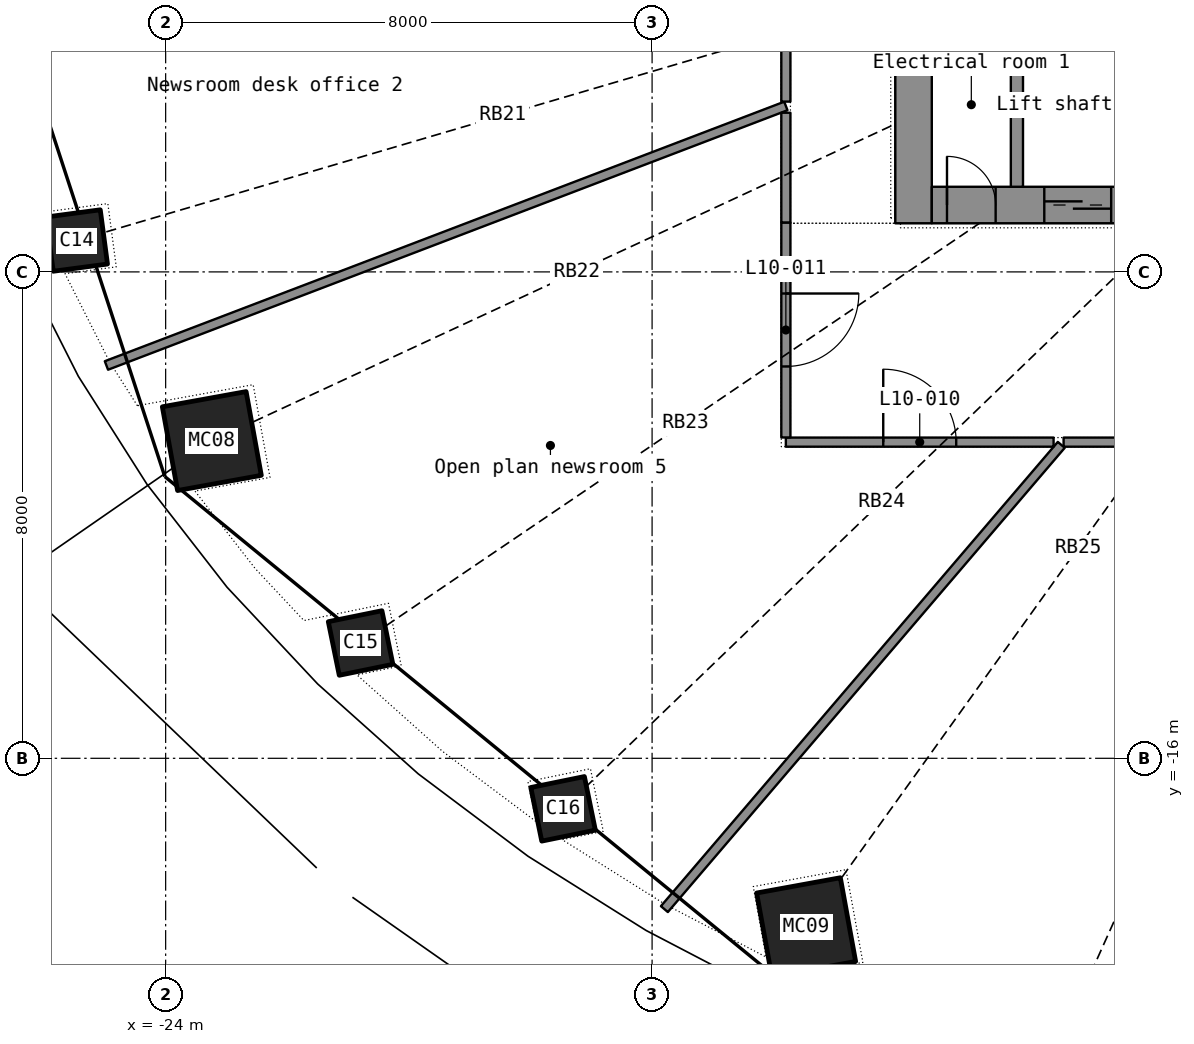
"""IFC4 building model, lengths in metres.
Left out: names, types, materials, properties, quantities, classifications, styles, units other than length and angle.
Written with IfcOpenShell. Run it as: python <this file> out.ifc"""

import sys

from ifc_helpers import new_model, si_unit, direction, frame, frame_2d, origin, origin_2d, place, context, subcontext, project, spatial, rectangle, hollow_rectangle, extrude, element, fill, save


model = new_model("IFC4")
c1 = context("Model", 3, precision=1e-05, world=origin(), true_north=direction((0.0, 1.0)))
c2 = subcontext(c1, "Body", "Model", "MODEL_VIEW")
j1 = project(units=[si_unit("LENGTHUNIT", "METRE"), si_unit("PLANEANGLEUNIT", "RADIAN")], contexts=[c1])
p1 = place(None, origin())
s1 = spatial("IfcSite", under=j1, at=p1, CompositionType="ELEMENT")
p2 = place(p1, origin())
s2 = spatial("IfcBuilding", under=s1, at=p2, CompositionType="ELEMENT")
p3 = place(p2, frame((0.0, 0.0, 48.2)))
s3 = spatial("IfcBuildingStorey", under=s2, at=p3, CompositionType="ELEMENT", Elevation=48.2)
p4 = place(p3, frame((-25.462, -7.484, 0.0), z_axis=(0.032511791, 0.009694185, 0.999424337), x_axis=(-0.409551544, 0.912276009, 0.004474057)))
e1 = element("IfcColumn", 1, at=p4, inside=s3, PredefinedType="COLUMN", context=c2, shape_type="SweptSolid", body=[
    extrude(hollow_rectangle(XDim=0.9, YDim=0.9, WallThickness=0.025, at=origin_2d()), origin(), (0.0, 0.0, 1.0), 3.702),
])
p5 = place(p3, frame((-23.24, -10.782, 0.0), z_axis=(0.029940667, 0.01417895, 0.999451106), x_axis=(-0.582456486, 0.812840346, 0.005917161)))
e2 = element("IfcColumn", 2, at=p5, inside=s3, PredefinedType="COLUMN", context=c2, shape_type="SweptSolid", body=[
    extrude(hollow_rectangle(XDim=1.4, YDim=1.4, WallThickness=0.04, at=origin_2d()), origin(), (0.0, 0.0, 1.0), 3.702),
])
p6 = place(p3, frame((-20.794, -14.104, 0.0), z_axis=(0.026512179, 0.018202391, 0.999482755), x_axis=(-0.719438902, 0.694525921, 0.006435189)))
e3 = element("IfcColumn", 3, at=p6, inside=s3, PredefinedType="COLUMN", context=c2, shape_type="SweptSolid", body=[
    extrude(hollow_rectangle(XDim=0.9, YDim=0.9, WallThickness=0.025, at=origin_2d()), origin(), (0.0, 0.0, 1.0), 3.702),
])
p7 = place(p3, frame((-17.464, -16.831, 0.0), z_axis=(0.022226156, 0.021698532, 0.999517469), x_axis=(-0.827675916, 0.561171863, 0.006222451)))
e4 = element("IfcColumn", 4, at=p7, inside=s3, PredefinedType="COLUMN", context=c2, shape_type="SweptSolid", body=[
    extrude(hollow_rectangle(XDim=0.9, YDim=0.9, WallThickness=0.025, at=origin_2d()), origin(), (0.0, 0.0, 1.0), 3.702),
])
p8 = place(p3, frame((-13.467, -18.779, 0.0), z_axis=(0.017346145, 0.024601186, 0.999546844), x_axis=(-0.907346436, 0.420348999, 0.005400326)))
e5 = element("IfcColumn", 5, at=p8, inside=s3, PredefinedType="COLUMN", context=c2, shape_type="SweptSolid", body=[
    extrude(hollow_rectangle(XDim=1.4, YDim=1.4, WallThickness=0.04, at=origin_2d()), origin(), (0.0, 0.0, 1.0), 3.702),
])
p9 = place(p3, frame((-11.7, -7.2, 0.0), z_axis=(0.0, 0.0, 1.0), x_axis=(0.0, 1.0, 0.0)))
e6 = element("IfcWall", 6, at=p9, inside=s3, PredefinedType="SHEAR", context=c2, shape_type="SweptSolid", body=[
    extrude(rectangle(XDim=14.4, YDim=0.6, at=frame_2d((7.2, 0.0))), origin(), (0.0, 0.0, 1.0), 3.3),
])
p10 = place(p9, frame((6.5, 0.0, 0.0)))
e7 = element("IfcOpeningElement", 7, at=p10, cuts=e6, PredefinedType="OPENING", context=c2, shape_type="SweptSolid", body=[
    extrude(rectangle(XDim=1.4, YDim=2.2, at=frame_2d((0.7, 1.1))), frame((0.0, 0.31, 0.0), z_axis=(0.0, -1.0, 0.0), x_axis=(1.0, 0.0, 0.0)), (0.0, 0.0, 1.0), 0.62),
])
p11 = place(p3, frame((-11.4, -6.9, 0.0), z_axis=(0.0, 0.0, 1.0), x_axis=(1.0, 0.0, 0.0)))
e8 = element("IfcWall", 8, at=p11, inside=s3, PredefinedType="SHEAR", context=c2, shape_type="SweptSolid", body=[
    extrude(rectangle(XDim=22.8, YDim=0.6, at=frame_2d((11.4, 0.0))), origin(), (0.0, 0.0, 1.0), 3.3),
])
p12 = place(p11, frame((1.85, 0.0, 0.0)))
e9 = element("IfcOpeningElement", 9, at=p12, cuts=e8, PredefinedType="OPENING", context=c2, shape_type="SweptSolid", body=[
    extrude(rectangle(XDim=1.1, YDim=2.2, at=frame_2d((0.55, 1.1))), frame((0.0, 0.31, 0.0), z_axis=(0.0, -1.0, 0.0), x_axis=(1.0, 0.0, 0.0)), (0.0, 0.0, 1.0), 0.62),
])
p13 = place(p11, frame((3.85, 0.0, 0.0)))
e10 = element("IfcOpeningElement", 10, at=p13, cuts=e8, PredefinedType="OPENING", context=c2, shape_type="SweptSolid", body=[
    extrude(rectangle(XDim=1.1, YDim=2.2, at=frame_2d((0.55, 1.1))), frame((0.0, 0.31, 0.0), z_axis=(0.0, -1.0, 0.0), x_axis=(1.0, 0.0, 0.0)), (0.0, 0.0, 1.0), 0.62),
])
p14 = place(p11, frame((5.85, 0.0, 0.0)))
e11 = element("IfcOpeningElement", 11, at=p14, cuts=e8, PredefinedType="OPENING", context=c2, shape_type="SweptSolid", body=[
    extrude(rectangle(XDim=1.1, YDim=2.2, at=frame_2d((0.55, 1.1))), frame((0.0, 0.31, 0.0), z_axis=(0.0, -1.0, 0.0), x_axis=(1.0, 0.0, 0.0)), (0.0, 0.0, 1.0), 0.62),
])
p15 = place(p11, frame((7.85, 0.0, 0.0)))
e12 = element("IfcOpeningElement", 12, at=p15, cuts=e8, PredefinedType="OPENING", context=c2, shape_type="SweptSolid", body=[
    extrude(rectangle(XDim=1.1, YDim=2.2, at=frame_2d((0.55, 1.1))), frame((0.0, 0.31, 0.0), z_axis=(0.0, -1.0, 0.0), x_axis=(1.0, 0.0, 0.0)), (0.0, 0.0, 1.0), 0.62),
])
p16 = place(p11, frame((9.85, 0.0, 0.0)))
e13 = element("IfcOpeningElement", 13, at=p16, cuts=e8, PredefinedType="OPENING", context=c2, shape_type="SweptSolid", body=[
    extrude(rectangle(XDim=1.1, YDim=2.2, at=frame_2d((0.55, 1.1))), frame((0.0, 0.31, 0.0), z_axis=(0.0, -1.0, 0.0), x_axis=(1.0, 0.0, 0.0)), (0.0, 0.0, 1.0), 0.62),
])
p17 = place(p11, frame((11.85, 0.0, 0.0)))
e14 = element("IfcOpeningElement", 14, at=p17, cuts=e8, PredefinedType="OPENING", context=c2, shape_type="SweptSolid", body=[
    extrude(rectangle(XDim=1.1, YDim=2.2, at=frame_2d((0.55, 1.1))), frame((0.0, 0.31, 0.0), z_axis=(0.0, -1.0, 0.0), x_axis=(1.0, 0.0, 0.0)), (0.0, 0.0, 1.0), 0.62),
])
p18 = place(p11, frame((13.85, 0.0, 0.0)))
e15 = element("IfcOpeningElement", 15, at=p18, cuts=e8, PredefinedType="OPENING", context=c2, shape_type="SweptSolid", body=[
    extrude(rectangle(XDim=1.1, YDim=2.2, at=frame_2d((0.55, 1.1))), frame((0.0, 0.31, 0.0), z_axis=(0.0, -1.0, 0.0), x_axis=(1.0, 0.0, 0.0)), (0.0, 0.0, 1.0), 0.62),
])
p19 = place(p11, frame((15.85, 0.0, 0.0)))
e16 = element("IfcOpeningElement", 16, at=p19, cuts=e8, PredefinedType="OPENING", context=c2, shape_type="SweptSolid", body=[
    extrude(rectangle(XDim=1.1, YDim=2.2, at=frame_2d((0.55, 1.1))), frame((0.0, 0.31, 0.0), z_axis=(0.0, -1.0, 0.0), x_axis=(1.0, 0.0, 0.0)), (0.0, 0.0, 1.0), 0.62),
])
p20 = place(p11, frame((19.85, 0.0, 0.0)))
e17 = element("IfcOpeningElement", 17, at=p20, cuts=e8, PredefinedType="OPENING", context=c2, shape_type="SweptSolid", body=[
    extrude(rectangle(XDim=1.1, YDim=2.2, at=frame_2d((0.55, 1.1))), frame((0.0, 0.31, 0.0), z_axis=(0.0, -1.0, 0.0), x_axis=(1.0, 0.0, 0.0)), (0.0, 0.0, 1.0), 0.62),
])
p21 = place(p11, frame((0.25, 0.0, 0.0)))
e18 = element("IfcOpeningElement", 18, at=p21, cuts=e8, PredefinedType="OPENING", context=c2, shape_type="SweptSolid", body=[
    extrude(rectangle(XDim=0.8, YDim=2.05, at=frame_2d((0.4, 1.025))), frame((0.0, 0.31, 0.0), z_axis=(0.0, -1.0, 0.0), x_axis=(1.0, 0.0, 0.0)), (0.0, 0.0, 1.0), 0.62),
])
p22 = place(p11, frame((21.75, 0.0, 0.0)))
e19 = element("IfcOpeningElement", 19, at=p22, cuts=e8, PredefinedType="OPENING", context=c2, shape_type="SweptSolid", body=[
    extrude(rectangle(XDim=0.8, YDim=2.05, at=frame_2d((0.4, 1.025))), frame((0.0, 0.31, 0.0), z_axis=(0.0, -1.0, 0.0), x_axis=(1.0, 0.0, 0.0)), (0.0, 0.0, 1.0), 0.62),
])
p23 = place(p3, frame((-10.0, -6.6, 0.0), z_axis=(0.0, 0.0, 1.0), x_axis=(0.0, 1.0, 0.0)))
e20 = element("IfcWall", 20, at=p23, inside=s3, PredefinedType="SHEAR", context=c2, shape_type="SweptSolid", body=[
    extrude(rectangle(XDim=2.7, YDim=0.2, at=frame_2d((1.35, 0.0))), origin(), (0.0, 0.0, 1.0), 3.3),
])
p24 = place(p3, frame((-9.232, -10.8, 0.0), z_axis=(0.0, 0.0, 1.0), x_axis=(1.0, 0.0, 0.0)))
e21 = element("IfcWall", 21, at=p24, inside=s3, PredefinedType="PARTITIONING", context=c2, shape_type="SweptSolid", body=[
    extrude(rectangle(XDim=15.381, YDim=0.15, at=frame_2d((7.69, 0.0))), origin(), (0.0, 0.0, 1.0), 2.4),
])
p25 = place(p24, frame((7.09, 0.0, 0.0)))
e22 = element("IfcOpeningElement", 22, at=p25, cuts=e21, PredefinedType="OPENING", context=c2, shape_type="SweptSolid", body=[
    extrude(rectangle(XDim=1.2, YDim=2.2, at=frame_2d((0.6, 1.1))), frame((0.0, 0.085, 0.0), z_axis=(0.0, -1.0, 0.0), x_axis=(1.0, 0.0, 0.0)), (0.0, 0.0, 1.0), 0.17),
])
p26 = place(p3, frame((-24.974, -9.539, 0.0), z_axis=(0.0, 0.0, 1.0), x_axis=(0.934173736, 0.356818485, 0.0)))
e23 = element("IfcWall", 23, at=p26, inside=s3, PredefinedType="PARTITIONING", context=c2, shape_type="SweptSolid", body=[
    extrude(rectangle(XDim=11.961, YDim=0.15, at=frame_2d((5.981, 0.0))), origin(), (0.0, 0.0, 1.0), 2.4),
])
p27 = place(p3, frame((-15.798, -18.48, 0.0), z_axis=(0.0, 0.0, 1.0), x_axis=(0.649794059, 0.760110308, 0.0)))
e24 = element("IfcWall", 24, at=p27, inside=s3, PredefinedType="PARTITIONING", context=c2, shape_type="SweptSolid", body=[
    extrude(rectangle(XDim=10.045, YDim=0.15, at=frame_2d((5.022, 0.0))), origin(), (0.0, 0.0, 1.0), 2.4),
])
p28 = place(p3, frame((-13.8, -10.8, 0.0), z_axis=(0.0, 0.0, 1.0), x_axis=(1.0, 0.0, 0.0)))
e25 = element("IfcWall", 25, at=p28, inside=s3, PredefinedType="PARTITIONING", context=c2, shape_type="SweptSolid", body=[
    extrude(rectangle(XDim=4.403, YDim=0.15, at=frame_2d((2.202, 0.0))), origin(), (0.0, 0.0, 1.0), 2.4),
])
p29 = place(p28, frame((1.602, 0.0, 0.0)))
e26 = element("IfcOpeningElement", 26, at=p29, cuts=e25, PredefinedType="OPENING", context=c2, shape_type="SweptSolid", body=[
    extrude(rectangle(XDim=1.2, YDim=2.2, at=frame_2d((0.6, 1.1))), frame((0.0, 0.085, 0.0), z_axis=(0.0, -1.0, 0.0), x_axis=(1.0, 0.0, 0.0)), (0.0, 0.0, 1.0), 0.17),
])
p30 = place(p3, frame((-13.8, -1.072, 0.0), z_axis=(0.0, 0.0, 1.0), x_axis=(0.0, -1.0, 0.0)))
e27 = element("IfcWall", 27, at=p30, inside=s3, PredefinedType="PARTITIONING", context=c2, shape_type="SweptSolid", body=[
    extrude(rectangle(XDim=4.127, YDim=0.15, at=frame_2d((2.064, 0.0))), origin(), (0.0, 0.0, 1.0), 2.4),
])
p31 = place(p30, frame((1.464, 0.0, 0.0)))
e28 = element("IfcOpeningElement", 28, at=p31, cuts=e27, PredefinedType="OPENING", context=c2, shape_type="SweptSolid", body=[
    extrude(rectangle(XDim=1.2, YDim=2.2, at=frame_2d((0.6, 1.1))), frame((0.0, 0.085, 0.0), z_axis=(0.0, -1.0, 0.0), x_axis=(1.0, 0.0, 0.0)), (0.0, 0.0, 1.0), 0.17),
])
p32 = place(p3, frame((-13.8, -7.188, 0.0), z_axis=(0.0, 0.0, 1.0), x_axis=(0.0, -1.0, 0.0)))
e29 = element("IfcWall", 29, at=p32, inside=s3, PredefinedType="PARTITIONING", context=c2, shape_type="SweptSolid", body=[
    extrude(rectangle(XDim=3.535, YDim=0.15, at=frame_2d((1.768, 0.0))), origin(), (0.0, 0.0, 1.0), 2.4),
])
p33 = place(p32, frame((1.167, 0.0, 0.0)))
e30 = element("IfcOpeningElement", 30, at=p33, cuts=e29, PredefinedType="OPENING", context=c2, shape_type="SweptSolid", body=[
    extrude(rectangle(XDim=1.2, YDim=2.2, at=frame_2d((0.6, 1.1))), frame((0.0, 0.085, 0.0), z_axis=(0.0, -1.0, 0.0), x_axis=(1.0, 0.0, 0.0)), (0.0, 0.0, 1.0), 0.17),
])
p34 = place(p3, frame((-13.8, -5.382, 0.0), z_axis=(0.0, 0.0, 1.0), x_axis=(0.0, -1.0, 0.0)))
e31 = element("IfcWall", 31, at=p34, inside=s3, PredefinedType="PARTITIONING", context=c2, shape_type="SweptSolid", body=[
    extrude(rectangle(XDim=1.805, YDim=0.15, at=frame_2d((0.902, 0.0))), origin(), (0.0, 0.0, 1.0), 2.4),
])
p35 = place(p12, origin())
e32 = element("IfcDoor", 32, at=p35, inside=s3, OperationType="DOUBLE_DOOR_SLIDING", PredefinedType="DOOR", context=c2, shape_type="SweptSolid", body=[
    extrude(rectangle(XDim=1.1, YDim=2.2, at=frame_2d((0.55, 1.1))), frame((0.0, 0.025, 0.0), z_axis=(0.0, -1.0, 0.0), x_axis=(1.0, 0.0, 0.0)), (0.0, 0.0, 1.0), 0.05),
])
fill(e9, e32)
p36 = place(p21, origin())
e33 = element("IfcDoor", 33, at=p36, inside=s3, OperationType="SINGLE_SWING_LEFT", PredefinedType="DOOR", context=c2, shape_type="SweptSolid", body=[
    extrude(rectangle(XDim=0.8, YDim=2.05, at=frame_2d((0.4, 1.025))), frame((0.0, 0.025, 0.0), z_axis=(0.0, -1.0, 0.0), x_axis=(1.0, 0.0, 0.0)), (0.0, 0.0, 1.0), 0.05),
])
fill(e18, e33)
p37 = place(p29, origin())
e34 = element("IfcDoor", 34, at=p37, inside=s3, OperationType="DOUBLE_DOOR_SINGLE_SWING", PredefinedType="DOOR", context=c2, shape_type="SweptSolid", body=[
    extrude(rectangle(XDim=1.2, YDim=2.2, at=frame_2d((0.6, 1.1))), frame((0.0, 0.025, 0.0), z_axis=(0.0, -1.0, 0.0), x_axis=(1.0, 0.0, 0.0)), (0.0, 0.0, 1.0), 0.05),
])
fill(e26, e34)
p38 = place(p33, origin())
e35 = element("IfcDoor", 35, at=p38, inside=s3, OperationType="DOUBLE_DOOR_SINGLE_SWING", PredefinedType="DOOR", context=c2, shape_type="SweptSolid", body=[
    extrude(rectangle(XDim=1.2, YDim=2.2, at=frame_2d((0.6, 1.1))), frame((0.0, 0.025, 0.0), z_axis=(0.0, -1.0, 0.0), x_axis=(1.0, 0.0, 0.0)), (0.0, 0.0, 1.0), 0.05),
])
fill(e30, e35)
save(model, sys.argv[1])
